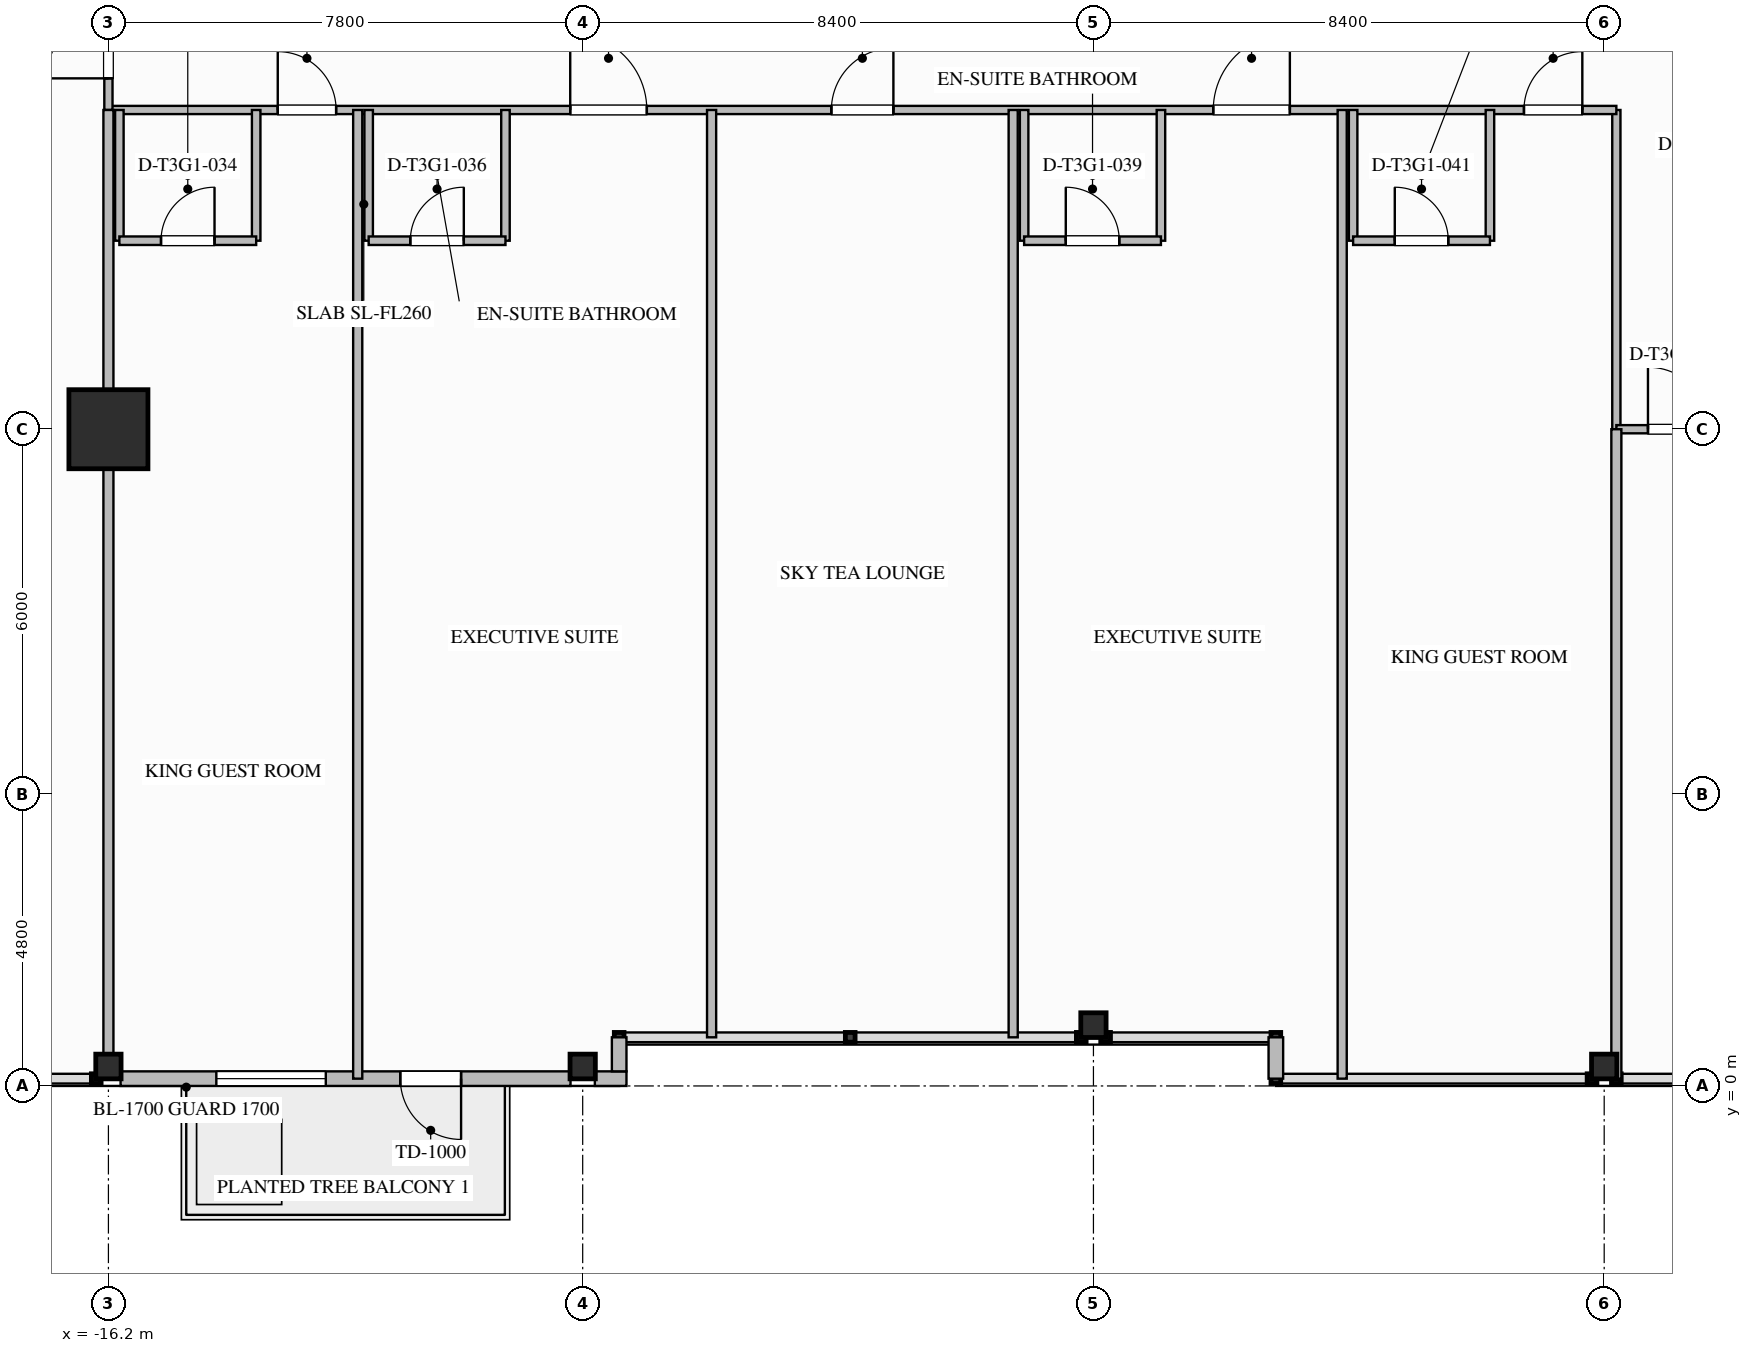
"""IFC4 building model, lengths in metres.
Left out: names, types, materials, properties, quantities, classifications, styles, units other than length and angle.
Written with IfcOpenShell. Run it as: python <this file> out.ifc"""

import sys

from ifc_helpers import new_model, si_unit, direction, frame, frame_2d, origin, origin_2d, place, context, subcontext, project, spatial, rectangle, i_section, extrude, element, fill, save


model = new_model("IFC4")
c1 = context("Model", 3, precision=1e-05, world=origin(), true_north=direction((0.0, 1.0)))
c2 = subcontext(c1, "Body", "Model", "MODEL_VIEW")
j1 = project(units=[si_unit("LENGTHUNIT", "METRE"), si_unit("PLANEANGLEUNIT", "RADIAN")], contexts=[c1])
p1 = place(None, origin())
s1 = spatial("IfcSite", under=j1, at=p1, CompositionType="ELEMENT")
p2 = place(p1, origin())
s2 = spatial("IfcBuilding", under=s1, at=p2, CompositionType="ELEMENT")
p3 = place(p2, frame((0.0, 0.0, 150.4)))
s3 = spatial("IfcBuildingStorey", under=s2, at=p3, CompositionType="ELEMENT", Elevation=150.4)
p4 = place(p3, frame((-16.2, 10.8, 0.0), z_axis=(0.0, 0.0, 1.0), x_axis=(1.0, 0.0, 0.0)))
e1 = element("IfcColumn", 1, at=p4, inside=s3, PredefinedType="COLUMN", context=c2, shape_type="SweptSolid", body=[
    extrude(rectangle(XDim=1.3, YDim=1.3, at=origin_2d()), origin(), (0.0, 0.0, 1.0), 3.55),
])
for number, where, z_axis, x_axis in (
    (2, (-16.2, 0.32, 0.0), (0.0, 0.0, 1.0), (0.0, 1.0, 0.0)),
    (3, (-8.4, 0.32, 0.0), (0.0, 0.0, 1.0), (0.0, 1.0, 0.0)),
    (4, (0.0, 1.0, 0.0), (0.0, 0.0, 1.0), (0.0, 1.0, 0.0)),
    (5, (8.4, 0.32, 0.0), (0.0, 0.0, 1.0), (0.0, 1.0, 0.0)),
):
    element("IfcColumn", number, at=place(p3, frame(where, z_axis=z_axis, x_axis=x_axis)), inside=s3, PredefinedType="COLUMN", context=c2, shape_type="SweptSolid", body=[
        extrude(i_section(OverallWidth=0.406, OverallDepth=0.416, WebThickness=0.03, FlangeThickness=0.048, FilletRadius=0.028, at=origin_2d()), origin(), (0.0, 0.0, 1.0), 3.547),
    ])
p5 = place(p3, frame((-8.6, 0.12, 0.0), z_axis=(0.0, 0.0, 1.0), x_axis=(-1.0, 0.0, 0.0)))
e6 = element("IfcWall", 6, at=p5, inside=s3, PredefinedType="STANDARD", context=c2, shape_type="SweptSolid", body=[
    extrude(rectangle(XDim=7.4, YDim=0.24, at=frame_2d((3.7, 0.0))), origin(), (0.0, 0.0, 1.0), 2.753),
])
p6 = place(p5, frame((1.8, 0.0, 0.0)))
e7 = element("IfcOpeningElement", 7, at=p6, cuts=e6, PredefinedType="OPENING", context=c2, shape_type="SweptSolid", body=[
    extrude(rectangle(XDim=1.0, YDim=2.2, at=frame_2d((0.5, 1.1))), frame((0.0, 0.13, 0.0), z_axis=(0.0, -1.0, 0.0), x_axis=(1.0, 0.0, 0.0)), (0.0, 0.0, 1.0), 0.26),
])
p7 = place(p5, frame((4.025, 0.0, 0.75)))
e8 = element("IfcOpeningElement", 8, at=p7, cuts=e6, PredefinedType="OPENING", context=c2, shape_type="SweptSolid", body=[
    extrude(rectangle(XDim=1.8, YDim=1.903, at=frame_2d((0.9, 0.952))), frame((0.0, 0.13, 0.0), z_axis=(0.0, -1.0, 0.0), x_axis=(1.0, 0.0, 0.0)), (0.0, 0.0, 1.0), 0.26),
])
p8 = place(p3, frame((-7.68, 0.12, 0.0), z_axis=(0.0, 0.0, 1.0), x_axis=(-1.0, 0.0, 0.0)))
e9 = element("IfcWall", 9, at=p8, inside=s3, PredefinedType="STANDARD", context=c2, shape_type="SweptSolid", body=[
    extrude(rectangle(XDim=0.52, YDim=0.24, at=frame_2d((0.26, 0.0))), origin(), (0.0, 0.0, 1.0), 3.29),
])
p9 = place(p3, frame((3.0, 0.12, 0.0), z_axis=(0.0, 0.0, 1.0), x_axis=(0.0, 1.0, 0.0)))
e10 = element("IfcWall", 10, at=p9, inside=s3, PredefinedType="STANDARD", context=c2, shape_type="SweptSolid", body=[
    extrude(rectangle(XDim=0.68, YDim=0.24, at=frame_2d((0.34, 0.0))), origin(), (0.0, 0.0, 1.0), 3.29),
])
p10 = place(p3, frame((-7.8, 0.8, 0.0), z_axis=(0.0, 0.0, 1.0), x_axis=(0.0, -1.0, 0.0)))
e11 = element("IfcWall", 11, at=p10, inside=s3, PredefinedType="STANDARD", context=c2, shape_type="SweptSolid", body=[
    extrude(rectangle(XDim=0.56, YDim=0.24, at=frame_2d((0.28, 0.0))), origin(), (0.0, 0.0, 1.0), 3.29),
])
p11 = place(p3, frame((8.6, 10.8, 0.0), z_axis=(0.0, 0.0, 1.0), x_axis=(0.0, 1.0, 0.0)))
e12 = element("IfcWall", 12, at=p11, inside=s3, PredefinedType="PARTITIONING", context=c2, shape_type="SweptSolid", body=[
    extrude(rectangle(XDim=5.25, YDim=0.135, at=frame_2d((2.625, 0.0))), origin(), (0.0, 0.0, 1.0), 2.667),
])
p12 = place(p3, frame((-16.2, 16.05, 0.0), z_axis=(0.0, 0.0, 1.0), x_axis=(1.0, 0.0, 0.0)))
e13 = element("IfcWall", 13, at=p12, inside=s3, PredefinedType="PARTITIONING", context=c2, shape_type="SweptSolid", body=[
    extrude(rectangle(XDim=24.8, YDim=0.135, at=frame_2d((12.4, 0.0))), origin(), (0.0, 0.0, 1.0), 3.29),
])
p13 = place(p12, frame((2.785, 0.0, 0.0)))
e14 = element("IfcOpeningElement", 14, at=p13, cuts=e13, PredefinedType="OPENING", context=c2, shape_type="SweptSolid", body=[
    extrude(rectangle(XDim=0.96, YDim=2.15, at=frame_2d((0.48, 1.075))), frame((0.0, 0.077, 0.0), z_axis=(0.0, -1.0, 0.0), x_axis=(1.0, 0.0, 0.0)), (0.0, 0.0, 1.0), 0.155),
])
p14 = place(p12, frame((7.595, 0.0, 0.0)))
e15 = element("IfcOpeningElement", 15, at=p14, cuts=e13, PredefinedType="OPENING", context=c2, shape_type="SweptSolid", body=[
    extrude(rectangle(XDim=1.26, YDim=2.2, at=frame_2d((0.63, 1.1))), frame((0.0, 0.077, 0.0), z_axis=(0.0, -1.0, 0.0), x_axis=(1.0, 0.0, 0.0)), (0.0, 0.0, 1.0), 0.155),
])
p15 = place(p12, frame((11.89, 0.0, 0.0)))
e16 = element("IfcOpeningElement", 16, at=p15, cuts=e13, PredefinedType="OPENING", context=c2, shape_type="SweptSolid", body=[
    extrude(rectangle(XDim=1.02, YDim=2.15, at=frame_2d((0.51, 1.075))), frame((0.0, 0.077, 0.0), z_axis=(0.0, -1.0, 0.0), x_axis=(1.0, 0.0, 0.0)), (0.0, 0.0, 1.0), 0.155),
])
p16 = place(p12, frame((18.17, 0.0, 0.0)))
e17 = element("IfcOpeningElement", 17, at=p16, cuts=e13, PredefinedType="OPENING", context=c2, shape_type="SweptSolid", body=[
    extrude(rectangle(XDim=1.26, YDim=2.2, at=frame_2d((0.63, 1.1))), frame((0.0, 0.077, 0.0), z_axis=(0.0, -1.0, 0.0), x_axis=(1.0, 0.0, 0.0)), (0.0, 0.0, 1.0), 0.155),
])
p17 = place(p12, frame((23.281, 0.0, 0.0)))
e18 = element("IfcOpeningElement", 18, at=p17, cuts=e13, PredefinedType="OPENING", context=c2, shape_type="SweptSolid", body=[
    extrude(rectangle(XDim=0.96, YDim=2.15, at=frame_2d((0.48, 1.075))), frame((0.0, 0.077, 0.0), z_axis=(0.0, -1.0, 0.0), x_axis=(1.0, 0.0, 0.0)), (0.0, 0.0, 1.0), 0.155),
])
p18 = place(p3, frame((-16.2, 16.05, 0.0), z_axis=(0.0, 0.0, 1.0), x_axis=(0.0, 1.0, 0.0)))
e19 = element("IfcWall", 19, at=p18, inside=s3, PredefinedType="PARTITIONING", context=c2, shape_type="SweptSolid", body=[
    extrude(rectangle(XDim=2.35, YDim=0.135, at=frame_2d((1.175, 0.0))), origin(), (0.0, 0.0, 1.0), 2.58),
])
p19 = place(p18, frame((0.52, 0.0, 0.0)))
e20 = element("IfcOpeningElement", 20, at=p19, cuts=e19, PredefinedType="OPENING", context=c2, shape_type="SweptSolid", body=[
    extrude(rectangle(XDim=1.02, YDim=2.15, at=frame_2d((0.51, 1.075))), frame((0.0, 0.077, 0.0), z_axis=(0.0, -1.0, 0.0), x_axis=(1.0, 0.0, 0.0)), (0.0, 0.0, 1.0), 0.155),
])
p20 = place(p3, frame((8.6, 10.8, 0.0), z_axis=(0.0, 0.0, 1.0), x_axis=(1.0, 0.0, 0.0)))
e21 = element("IfcWall", 21, at=p20, inside=s3, PredefinedType="PARTITIONING", context=c2, shape_type="SweptSolid", body=[
    extrude(rectangle(XDim=2.35, YDim=0.135, at=frame_2d((1.175, 0.0))), origin(), (0.0, 0.0, 1.0), 2.58),
])
p21 = place(p20, frame((0.52, 0.0, 0.0)))
e22 = element("IfcOpeningElement", 22, at=p21, cuts=e21, PredefinedType="OPENING", context=c2, shape_type="SweptSolid", body=[
    extrude(rectangle(XDim=1.02, YDim=2.15, at=frame_2d((0.51, 1.075))), frame((0.0, 0.077, 0.0), z_axis=(0.0, -1.0, 0.0), x_axis=(1.0, 0.0, 0.0)), (0.0, 0.0, 1.0), 0.155),
])
p22 = place(p3, frame((-16.2, 0.12, 0.0), z_axis=(0.0, 0.0, 1.0), x_axis=(0.0, 1.0, 0.0)))
e23 = element("IfcWall", 23, at=p22, inside=s3, PredefinedType="PARTITIONING", context=c2, shape_type="SweptSolid", body=[
    extrude(rectangle(XDim=15.93, YDim=0.165, at=frame_2d((7.965, 0.0))), origin(), (0.0, 0.0, 1.0), 2.58),
])
p23 = place(p3, frame((8.6, 0.12, 0.0), z_axis=(0.0, 0.0, 1.0), x_axis=(0.0, 1.0, 0.0)))
e24 = element("IfcWall", 24, at=p23, inside=s3, PredefinedType="PARTITIONING", context=c2, shape_type="SweptSolid", body=[
    extrude(rectangle(XDim=10.68, YDim=0.165, at=frame_2d((5.34, 0.0))), origin(), (0.0, 0.0, 1.0), 2.58),
])
p24 = place(p3, frame((-16.02, 16.05, 0.0), z_axis=(0.0, 0.0, 1.0), x_axis=(0.0, -1.0, 0.0)))
e25 = element("IfcWall", 25, at=p24, inside=s3, PredefinedType="PLUMBINGWALL", context=c2, shape_type="SweptSolid", body=[
    extrude(rectangle(XDim=2.15, YDim=0.14, at=frame_2d((1.075, 0.0))), origin(), (0.0, 0.0, 1.0), 2.58),
])
p25 = place(p3, frame((-13.77, 16.05, 0.0), z_axis=(0.0, 0.0, 1.0), x_axis=(0.0, -1.0, 0.0)))
e26 = element("IfcWall", 26, at=p25, inside=s3, PredefinedType="PLUMBINGWALL", context=c2, shape_type="SweptSolid", body=[
    extrude(rectangle(XDim=2.15, YDim=0.14, at=frame_2d((1.075, 0.0))), origin(), (0.0, 0.0, 1.0), 3.29),
])
p26 = place(p3, frame((-16.02, 13.9, 0.0), z_axis=(0.0, 0.0, 1.0), x_axis=(1.0, 0.0, 0.0)))
e27 = element("IfcWall", 27, at=p26, inside=s3, PredefinedType="PLUMBINGWALL", context=c2, shape_type="SweptSolid", body=[
    extrude(rectangle(XDim=2.25, YDim=0.14, at=frame_2d((1.125, 0.0))), origin(), (0.0, 0.0, 1.0), 3.29),
])
p27 = place(p26, frame((0.685, 0.0, 0.0)))
e28 = element("IfcOpeningElement", 28, at=p27, cuts=e27, PredefinedType="OPENING", context=c2, shape_type="SweptSolid", body=[
    extrude(rectangle(XDim=0.88, YDim=2.1, at=frame_2d((0.44, 1.05))), frame((0.0, 0.08, 0.0), z_axis=(0.0, -1.0, 0.0), x_axis=(1.0, 0.0, 0.0)), (0.0, 0.0, 1.0), 0.16),
])
p28 = place(p3, frame((-12.1, 0.12, 0.0), z_axis=(0.0, 0.0, 1.0), x_axis=(0.0, 1.0, 0.0)))
e29 = element("IfcWall", 29, at=p28, inside=s3, PredefinedType="PARTITIONING", context=c2, shape_type="SweptSolid", body=[
    extrude(rectangle(XDim=15.93, YDim=0.15, at=frame_2d((7.965, 0.0))), origin(), (0.0, 0.0, 1.0), 2.815),
])
for number, where, z_axis, x_axis in (
    (30, (-11.92, 16.05, 0.0), (0.0, 0.0, 1.0), (0.0, -1.0, 0.0)),
    (31, (-9.67, 16.05, 0.0), (0.0, 0.0, 1.0), (0.0, -1.0, 0.0)),
):
    element("IfcWall", number, at=place(p3, frame(where, z_axis=z_axis, x_axis=x_axis)), inside=s3, PredefinedType="PLUMBINGWALL", context=c2, shape_type="SweptSolid", body=[
        extrude(rectangle(XDim=2.15, YDim=0.14, at=frame_2d((1.075, 0.0))), origin(), (0.0, 0.0, 1.0), 3.29),
    ])
p29 = place(p3, frame((-11.92, 13.9, 0.0), z_axis=(0.0, 0.0, 1.0), x_axis=(1.0, 0.0, 0.0)))
e32 = element("IfcWall", 32, at=p29, inside=s3, PredefinedType="PLUMBINGWALL", context=c2, shape_type="SweptSolid", body=[
    extrude(rectangle(XDim=2.25, YDim=0.14, at=frame_2d((1.125, 0.0))), origin(), (0.0, 0.0, 1.0), 3.29),
])
p30 = place(p29, frame((0.685, 0.0, 0.0)))
e33 = element("IfcOpeningElement", 33, at=p30, cuts=e32, PredefinedType="OPENING", context=c2, shape_type="SweptSolid", body=[
    extrude(rectangle(XDim=0.88, YDim=2.1, at=frame_2d((0.44, 1.05))), frame((0.0, 0.08, 0.0), z_axis=(0.0, -1.0, 0.0), x_axis=(1.0, 0.0, 0.0)), (0.0, 0.0, 1.0), 0.16),
])
for number, where, z_axis, x_axis in (
    (34, (-6.28, 0.8, 0.0), (0.0, 0.0, 1.0), (0.0, 1.0, 0.0)),
    (35, (-1.32, 0.8, 0.0), (0.0, 0.0, 1.0), (0.0, 1.0, 0.0)),
):
    element("IfcWall", number, at=place(p3, frame(where, z_axis=z_axis, x_axis=x_axis)), inside=s3, PredefinedType="PARTITIONING", context=c2, shape_type="SweptSolid", body=[
        extrude(rectangle(XDim=15.25, YDim=0.15, at=frame_2d((7.625, 0.0))), origin(), (0.0, 0.0, 1.0), 3.29),
    ])
for number, where, z_axis, x_axis in (
    (36, (-1.14, 16.05, 0.0), (0.0, 0.0, 1.0), (0.0, -1.0, 0.0)),
    (37, (1.11, 16.05, 0.0), (0.0, 0.0, 1.0), (0.0, -1.0, 0.0)),
):
    element("IfcWall", number, at=place(p3, frame(where, z_axis=z_axis, x_axis=x_axis)), inside=s3, PredefinedType="PLUMBINGWALL", context=c2, shape_type="SweptSolid", body=[
        extrude(rectangle(XDim=2.15, YDim=0.14, at=frame_2d((1.075, 0.0))), origin(), (0.0, 0.0, 1.0), 3.29),
    ])
p31 = place(p3, frame((-1.14, 13.9, 0.0), z_axis=(0.0, 0.0, 1.0), x_axis=(1.0, 0.0, 0.0)))
e38 = element("IfcWall", 38, at=p31, inside=s3, PredefinedType="PLUMBINGWALL", context=c2, shape_type="SweptSolid", body=[
    extrude(rectangle(XDim=2.25, YDim=0.14, at=frame_2d((1.125, 0.0))), origin(), (0.0, 0.0, 1.0), 3.29),
])
p32 = place(p31, frame((0.685, 0.0, 0.0)))
e39 = element("IfcOpeningElement", 39, at=p32, cuts=e38, PredefinedType="OPENING", context=c2, shape_type="SweptSolid", body=[
    extrude(rectangle(XDim=0.88, YDim=2.1, at=frame_2d((0.44, 1.05))), frame((0.0, 0.08, 0.0), z_axis=(0.0, -1.0, 0.0), x_axis=(1.0, 0.0, 0.0)), (0.0, 0.0, 1.0), 0.16),
])
p33 = place(p3, frame((4.091, 0.12, 0.0), z_axis=(0.0, 0.0, 1.0), x_axis=(0.0, 1.0, 0.0)))
e40 = element("IfcWall", 40, at=p33, inside=s3, PredefinedType="PARTITIONING", context=c2, shape_type="SweptSolid", body=[
    extrude(rectangle(XDim=15.93, YDim=0.15, at=frame_2d((7.965, 0.0))), origin(), (0.0, 0.0, 1.0), 3.29),
])
for number, where, z_axis, x_axis in (
    (41, (4.271, 16.05, 0.0), (0.0, 0.0, 1.0), (0.0, -1.0, 0.0)),
    (42, (6.521, 16.05, 0.0), (0.0, 0.0, 1.0), (0.0, -1.0, 0.0)),
):
    element("IfcWall", number, at=place(p3, frame(where, z_axis=z_axis, x_axis=x_axis)), inside=s3, PredefinedType="PLUMBINGWALL", context=c2, shape_type="SweptSolid", body=[
        extrude(rectangle(XDim=2.15, YDim=0.14, at=frame_2d((1.075, 0.0))), origin(), (0.0, 0.0, 1.0), 3.29),
    ])
p34 = place(p3, frame((4.271, 13.9, 0.0), z_axis=(0.0, 0.0, 1.0), x_axis=(1.0, 0.0, 0.0)))
e43 = element("IfcWall", 43, at=p34, inside=s3, PredefinedType="PLUMBINGWALL", context=c2, shape_type="SweptSolid", body=[
    extrude(rectangle(XDim=2.25, YDim=0.14, at=frame_2d((1.125, 0.0))), origin(), (0.0, 0.0, 1.0), 3.29),
])
p35 = place(p34, frame((0.685, 0.0, 0.0)))
e44 = element("IfcOpeningElement", 44, at=p35, cuts=e43, PredefinedType="OPENING", context=c2, shape_type="SweptSolid", body=[
    extrude(rectangle(XDim=0.88, YDim=2.1, at=frame_2d((0.44, 1.05))), frame((0.0, 0.08, 0.0), z_axis=(0.0, -1.0, 0.0), x_axis=(1.0, 0.0, 0.0)), (0.0, 0.0, 1.0), 0.16),
])
p36 = place(p6, origin())
e45 = element("IfcDoor", 45, at=p36, inside=s3, OperationType="SINGLE_SWING_LEFT", PredefinedType="DOOR", context=c2, shape_type="SweptSolid", body=[
    extrude(rectangle(XDim=1.0, YDim=2.2, at=frame_2d((0.5, 1.1))), frame((0.0, 0.025, 0.0), z_axis=(0.0, -1.0, 0.0), x_axis=(1.0, 0.0, 0.0)), (0.0, 0.0, 1.0), 0.05),
])
fill(e7, e45)
p37 = place(p7, origin())
e46 = element("IfcWindow", 46, at=p37, inside=s3, PartitioningType="SINGLE_PANEL", PredefinedType="WINDOW", context=c2, shape_type="SweptSolid", body=[
    extrude(rectangle(XDim=1.8, YDim=1.903, at=frame_2d((0.9, 0.952))), frame((0.0, 0.03, 0.0), z_axis=(0.0, -1.0, 0.0), x_axis=(1.0, 0.0, 0.0)), (0.0, 0.0, 1.0), 0.06),
])
fill(e8, e46)
p38 = place(p19, origin())
e47 = element("IfcDoor", 47, at=p38, inside=s3, OperationType="SINGLE_SWING_LEFT", PredefinedType="DOOR", context=c2, shape_type="SweptSolid", body=[
    extrude(rectangle(XDim=1.02, YDim=2.15, at=frame_2d((0.51, 1.075))), frame((0.0, 0.025, 0.0), z_axis=(0.0, -1.0, 0.0), x_axis=(1.0, 0.0, 0.0)), (0.0, 0.0, 1.0), 0.05),
])
fill(e20, e47)
p39 = place(p21, origin())
e48 = element("IfcDoor", 48, at=p39, inside=s3, OperationType="SINGLE_SWING_LEFT", PredefinedType="DOOR", context=c2, shape_type="SweptSolid", body=[
    extrude(rectangle(XDim=1.02, YDim=2.15, at=frame_2d((0.51, 1.075))), frame((0.0, 0.025, 0.0), z_axis=(0.0, -1.0, 0.0), x_axis=(1.0, 0.0, 0.0)), (0.0, 0.0, 1.0), 0.05),
])
fill(e22, e48)
p40 = place(p27, origin())
e49 = element("IfcDoor", 49, at=p40, inside=s3, OperationType="SINGLE_SWING_RIGHT", PredefinedType="DOOR", context=c2, shape_type="SweptSolid", body=[
    extrude(rectangle(XDim=0.88, YDim=2.1, at=frame_2d((0.44, 1.05))), frame((0.0, 0.025, 0.0), z_axis=(0.0, -1.0, 0.0), x_axis=(1.0, 0.0, 0.0)), (0.0, 0.0, 1.0), 0.05),
])
fill(e28, e49)
p41 = place(p13, origin())
e50 = element("IfcDoor", 50, at=p41, inside=s3, OperationType="SINGLE_SWING_LEFT", PredefinedType="DOOR", context=c2, shape_type="SweptSolid", body=[
    extrude(rectangle(XDim=0.96, YDim=2.15, at=frame_2d((0.48, 1.075))), frame((0.0, 0.025, 0.0), z_axis=(0.0, -1.0, 0.0), x_axis=(1.0, 0.0, 0.0)), (0.0, 0.0, 1.0), 0.05),
])
fill(e14, e50)
p42 = place(p30, origin())
e51 = element("IfcDoor", 51, at=p42, inside=s3, OperationType="SINGLE_SWING_RIGHT", PredefinedType="DOOR", context=c2, shape_type="SweptSolid", body=[
    extrude(rectangle(XDim=0.88, YDim=2.1, at=frame_2d((0.44, 1.05))), frame((0.0, 0.025, 0.0), z_axis=(0.0, -1.0, 0.0), x_axis=(1.0, 0.0, 0.0)), (0.0, 0.0, 1.0), 0.05),
])
fill(e33, e51)
p43 = place(p14, origin())
e52 = element("IfcDoor", 52, at=p43, inside=s3, OperationType="SINGLE_SWING_LEFT", PredefinedType="DOOR", context=c2, shape_type="SweptSolid", body=[
    extrude(rectangle(XDim=1.26, YDim=2.2, at=frame_2d((0.63, 1.1))), frame((0.0, 0.025, 0.0), z_axis=(0.0, -1.0, 0.0), x_axis=(1.0, 0.0, 0.0)), (0.0, 0.0, 1.0), 0.05),
])
fill(e15, e52)
p44 = place(p15, origin())
e53 = element("IfcDoor", 53, at=p44, inside=s3, OperationType="SINGLE_SWING_RIGHT", PredefinedType="DOOR", context=c2, shape_type="SweptSolid", body=[
    extrude(rectangle(XDim=1.02, YDim=2.15, at=frame_2d((0.51, 1.075))), frame((0.0, 0.025, 0.0), z_axis=(0.0, -1.0, 0.0), x_axis=(1.0, 0.0, 0.0)), (0.0, 0.0, 1.0), 0.05),
])
fill(e16, e53)
p45 = place(p32, origin())
e54 = element("IfcDoor", 54, at=p45, inside=s3, OperationType="SINGLE_SWING_LEFT", PredefinedType="DOOR", context=c2, shape_type="SweptSolid", body=[
    extrude(rectangle(XDim=0.88, YDim=2.1, at=frame_2d((0.44, 1.05))), frame((0.0, 0.025, 0.0), z_axis=(0.0, -1.0, 0.0), x_axis=(1.0, 0.0, 0.0)), (0.0, 0.0, 1.0), 0.05),
])
fill(e39, e54)
p46 = place(p16, origin())
e55 = element("IfcDoor", 55, at=p46, inside=s3, OperationType="SINGLE_SWING_RIGHT", PredefinedType="DOOR", context=c2, shape_type="SweptSolid", body=[
    extrude(rectangle(XDim=1.26, YDim=2.2, at=frame_2d((0.63, 1.1))), frame((0.0, 0.025, 0.0), z_axis=(0.0, -1.0, 0.0), x_axis=(1.0, 0.0, 0.0)), (0.0, 0.0, 1.0), 0.05),
])
fill(e17, e55)
p47 = place(p35, origin())
e56 = element("IfcDoor", 56, at=p47, inside=s3, OperationType="SINGLE_SWING_LEFT", PredefinedType="DOOR", context=c2, shape_type="SweptSolid", body=[
    extrude(rectangle(XDim=0.88, YDim=2.1, at=frame_2d((0.44, 1.05))), frame((0.0, 0.025, 0.0), z_axis=(0.0, -1.0, 0.0), x_axis=(1.0, 0.0, 0.0)), (0.0, 0.0, 1.0), 0.05),
])
fill(e44, e56)
p48 = place(p17, origin())
e57 = element("IfcDoor", 57, at=p48, inside=s3, OperationType="SINGLE_SWING_RIGHT", PredefinedType="DOOR", context=c2, shape_type="SweptSolid", body=[
    extrude(rectangle(XDim=0.96, YDim=2.15, at=frame_2d((0.48, 1.075))), frame((0.0, 0.025, 0.0), z_axis=(0.0, -1.0, 0.0), x_axis=(1.0, 0.0, 0.0)), (0.0, 0.0, 1.0), 0.05),
])
fill(e18, e57)
save(model, sys.argv[1])
